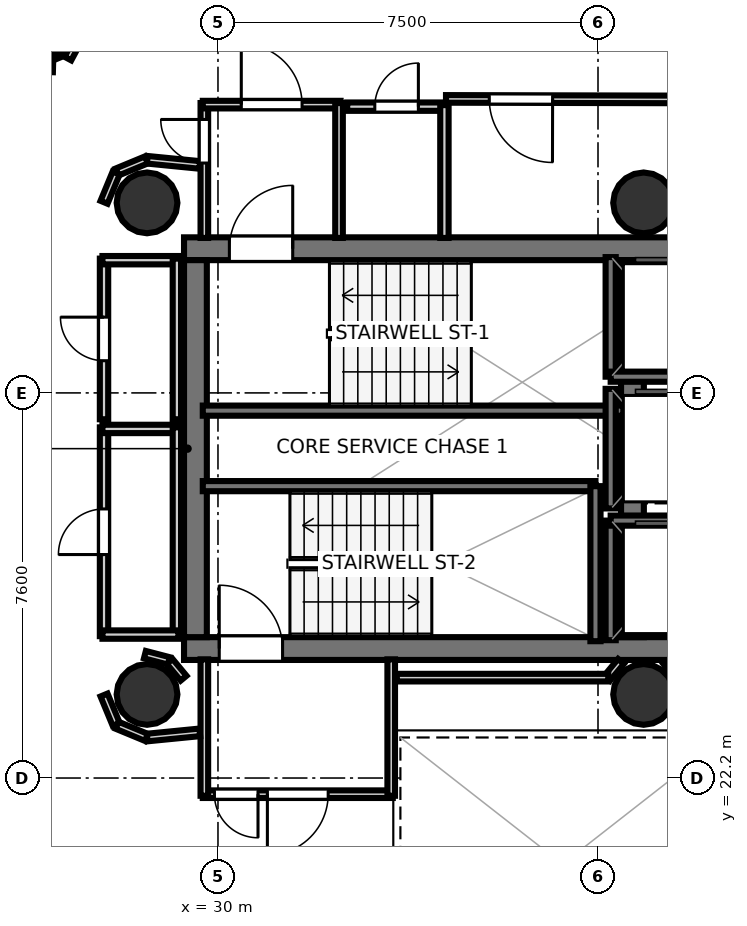
"""IFC4 building model, lengths in metres.
Left out: names, types, materials, properties, quantities, classifications, styles, units other than length and angle.
Written with IfcOpenShell. Run it as: python <this file> out.ifc"""

import sys

from ifc_helpers import new_model, si_unit, direction, frame, frame_2d, origin, origin_2d, place, context, subcontext, project, spatial, rectangle, hollow_circle, extrude, element, fill, save


model = new_model("IFC4")
c1 = context("Model", 3, precision=1e-05, world=origin(), true_north=direction((0.0, 1.0)))
c2 = subcontext(c1, "Body", "Model", "MODEL_VIEW")
j1 = project(units=[si_unit("LENGTHUNIT", "METRE"), si_unit("PLANEANGLEUNIT", "RADIAN")], contexts=[c1])
p1 = place(None, origin())
s1 = spatial("IfcSite", under=j1, at=p1, CompositionType="ELEMENT")
p2 = place(p1, origin())
s2 = spatial("IfcBuilding", under=s1, at=p2, CompositionType="ELEMENT")
p3 = place(p2, frame((0.0, 0.0, 222.5)))
s3 = spatial("IfcBuildingStorey", under=s2, at=p3, CompositionType="ELEMENT", Elevation=222.5)
p4 = place(p3, frame((29.33, 32.645, 0.0), z_axis=(0.0, 0.0, 1.0), x_axis=(1.0, 0.0, 0.0)))
e1 = element("IfcWall", 1, at=p4, inside=s3, PredefinedType="SHEAR", context=c2, shape_type="SweptSolid", body=[
    extrude(rectangle(XDim=10.52, YDim=0.45, at=frame_2d((5.26, 0.0))), origin(), (0.0, 0.0, 1.0), 3.52),
])
p5 = place(p4, frame((0.895, 0.0, 0.0)))
e2 = element("IfcOpeningElement", 2, at=p5, cuts=e1, PredefinedType="OPENING", context=c2, shape_type="SweptSolid", body=[
    extrude(rectangle(XDim=1.25, YDim=2.15, at=frame_2d((0.625, 1.075))), frame((0.0, 0.235, 0.0), z_axis=(0.0, -1.0, 0.0), x_axis=(1.0, 0.0, 0.0)), (0.0, 0.0, 1.0), 0.47),
])
p6 = place(p3, frame((29.33, 24.755, 0.0), z_axis=(0.0, 0.0, 1.0), x_axis=(1.0, 0.0, 0.0)))
e3 = element("IfcWall", 3, at=p6, inside=s3, PredefinedType="SHEAR", context=c2, shape_type="SweptSolid", body=[
    extrude(rectangle(XDim=10.52, YDim=0.45, at=frame_2d((5.26, 0.0))), origin(), (0.0, 0.0, 1.0), 3.52),
])
p7 = place(p6, frame((0.695, 0.0, 0.0)))
e4 = element("IfcOpeningElement", 4, at=p7, cuts=e3, PredefinedType="OPENING", context=c2, shape_type="SweptSolid", body=[
    extrude(rectangle(XDim=1.25, YDim=2.15, at=frame_2d((0.625, 1.075))), frame((0.0, 0.235, 0.0), z_axis=(0.0, -1.0, 0.0), x_axis=(1.0, 0.0, 0.0)), (0.0, 0.0, 1.0), 0.47),
])
for number, where, z_axis, x_axis in (
    (5, (29.555, 24.98, 0.0), (0.0, 0.0, 1.0), (0.0, 1.0, 0.0)),
    (6, (38.18, 24.98, 0.0), (0.0, 0.0, 1.0), (0.0, 1.0, 0.0)),
):
    element("IfcWall", number, at=place(p3, frame(where, z_axis=z_axis, x_axis=x_axis)), inside=s3, PredefinedType="SHEAR", context=c2, shape_type="SweptSolid", body=[
        extrude(rectangle(XDim=7.44, YDim=0.45, at=frame_2d((3.72, 0.0))), origin(), (0.0, 0.0, 1.0), 3.52),
    ])
for number, where, z_axis, x_axis in (
    (7, (28.6, 33.55, 0.0), (0.0, 0.0, 1.0), (1.0, 0.0, 0.0)),
    (8, (28.6, 23.85, 0.0), (0.0, 0.0, 1.0), (1.0, 0.0, 0.0)),
    (9, (38.4, 33.55, 0.0), (0.0, 0.0, 1.0), (1.0, 0.0, 0.0)),
    (10, (38.4, 23.85, 0.0), (0.0, 0.0, 1.0), (1.0, 0.0, 0.0)),
    (11, (26.431, 36.992, 0.0), (0.0, 0.0, 1.0), (1.0, 0.0, 0.0)),
):
    element("IfcColumn", number, at=place(p3, frame(where, z_axis=z_axis, x_axis=x_axis)), inside=s3, PredefinedType="COLUMN", context=c2, shape_type="SweptSolid", body=[
        extrude(hollow_circle(Radius=0.6, WallThickness=0.03, at=origin_2d()), origin(), (0.0, 0.0, 1.0), 3.7),
    ])
p8 = place(p3, frame((29.7, 29.45, 0.0), z_axis=(0.0, 0.0, 1.0), x_axis=(1.0, 0.0, 0.0)))
e12 = element("IfcWall", 12, at=p8, inside=s3, PredefinedType="SOLIDWALL", context=c2, shape_type="SweptSolid", body=[
    extrude(rectangle(XDim=8.3, YDim=0.2, at=frame_2d((4.15, 0.0))), origin(), (0.0, 0.0, 1.0), 3.52),
])
p9 = place(p3, frame((29.7, 27.96, 0.0), z_axis=(0.0, 0.0, 1.0), x_axis=(1.0, 0.0, 0.0)))
e13 = element("IfcWall", 13, at=p9, inside=s3, PredefinedType="SOLIDWALL", context=c2, shape_type="SweptSolid", body=[
    extrude(rectangle(XDim=7.75, YDim=0.2, at=frame_2d((3.875, 0.0))), origin(), (0.0, 0.0, 1.0), 3.52),
])
p10 = place(p3, frame((37.45, 24.9, 0.0), z_axis=(0.0, 0.0, 1.0), x_axis=(0.0, 1.0, 0.0)))
e14 = element("IfcWall", 14, at=p10, inside=s3, PredefinedType="SOLIDWALL", context=c2, shape_type="SweptSolid", body=[
    extrude(rectangle(XDim=3.06, YDim=0.2, at=frame_2d((1.53, 0.0))), origin(), (0.0, 0.0, 1.0), 3.52),
])
p11 = place(p3, frame((37.75, 30.12, 0.0), z_axis=(0.0, 0.0, 1.0), x_axis=(0.0, 1.0, 0.0)))
e15 = element("IfcWall", 15, at=p11, inside=s3, PredefinedType="SOLIDWALL", context=c2, shape_type="SweptSolid", body=[
    extrude(rectangle(XDim=2.36, YDim=0.2, at=frame_2d((1.18, 0.0))), origin(), (0.0, 0.0, 1.0), 3.52),
])
p12 = place(p3, frame((37.75, 30.12, 0.0), z_axis=(0.0, 0.0, 1.0), x_axis=(1.0, 0.0, 0.0)))
e16 = element("IfcWall", 16, at=p12, inside=s3, PredefinedType="SOLIDWALL", context=c2, shape_type="SweptSolid", body=[
    extrude(rectangle(XDim=2.1, YDim=0.2, at=frame_2d((1.05, 0.0))), origin(), (0.0, 0.0, 1.0), 3.52),
])
p13 = place(p3, frame((37.75, 24.92, 0.0), z_axis=(0.0, 0.0, 1.0), x_axis=(0.0, 1.0, 0.0)))
e17 = element("IfcWall", 17, at=p13, inside=s3, PredefinedType="SOLIDWALL", context=c2, shape_type="SweptSolid", body=[
    extrude(rectangle(XDim=2.36, YDim=0.2, at=frame_2d((1.18, 0.0))), origin(), (0.0, 0.0, 1.0), 3.52),
])
p14 = place(p3, frame((37.75, 27.28, 0.0), z_axis=(0.0, 0.0, 1.0), x_axis=(1.0, 0.0, 0.0)))
e18 = element("IfcWall", 18, at=p14, inside=s3, PredefinedType="SOLIDWALL", context=c2, shape_type="SweptSolid", body=[
    extrude(rectangle(XDim=2.1, YDim=0.2, at=frame_2d((1.05, 0.0))), origin(), (0.0, 0.0, 1.0), 3.52),
])
p15 = place(p3, frame((37.75, 27.52, 0.0), z_axis=(0.0, 0.0, 1.0), x_axis=(0.0, 1.0, 0.0)))
e19 = element("IfcWall", 19, at=p15, inside=s3, PredefinedType="SOLIDWALL", context=c2, shape_type="SweptSolid", body=[
    extrude(rectangle(XDim=2.36, YDim=0.2, at=frame_2d((1.18, 0.0))), origin(), (0.0, 0.0, 1.0), 3.52),
])
p16 = place(p3, frame((29.731, 32.858, 0.0), z_axis=(0.0, 0.0, 1.0), x_axis=(0.0, 1.0, 0.0)))
e20 = element("IfcWall", 20, at=p16, inside=s3, PredefinedType="PARTITIONING", context=c2, shape_type="SweptSolid", body=[
    extrude(rectangle(XDim=2.662, YDim=0.15, at=frame_2d((1.331, 0.0))), origin(), (0.0, 0.0, 1.0), 2.84),
])
p17 = place(p16, frame((1.478, 0.0, 0.0)))
e21 = element("IfcOpeningElement", 21, at=p17, cuts=e20, PredefinedType="OPENING", context=c2, shape_type="SweptSolid", body=[
    extrude(rectangle(XDim=0.86, YDim=2.05, at=frame_2d((0.43, 1.025))), frame((0.0, 0.085, 0.0), z_axis=(0.0, -1.0, 0.0), x_axis=(1.0, 0.0, 0.0)), (0.0, 0.0, 1.0), 0.17),
])
p18 = place(p3, frame((29.7, 35.489, 0.0), z_axis=(0.0, 0.0, 1.0), x_axis=(1.0, 0.0, 0.0)))
e22 = element("IfcWall", 22, at=p18, inside=s3, PredefinedType="PARTITIONING", context=c2, shape_type="SweptSolid", body=[
    extrude(rectangle(XDim=2.72, YDim=0.15, at=frame_2d((1.36, 0.0))), origin(), (0.0, 0.0, 1.0), 2.84),
])
p19 = place(p18, frame((0.76, 0.0, 0.0)))
e23 = element("IfcOpeningElement", 23, at=p19, cuts=e22, PredefinedType="OPENING", context=c2, shape_type="SweptSolid", body=[
    extrude(rectangle(XDim=1.2, YDim=2.15, at=frame_2d((0.6, 1.075))), frame((0.0, 0.085, 0.0), z_axis=(0.0, -1.0, 0.0), x_axis=(1.0, 0.0, 0.0)), (0.0, 0.0, 1.0), 0.17),
])
p20 = place(p3, frame((32.389, 35.52, 0.0), z_axis=(0.0, 0.0, 1.0), x_axis=(0.0, -1.0, 0.0)))
e24 = element("IfcWall", 24, at=p20, inside=s3, PredefinedType="PARTITIONING", context=c2, shape_type="SweptSolid", body=[
    extrude(rectangle(XDim=2.662, YDim=0.15, at=frame_2d((1.331, 0.0))), origin(), (0.0, 0.0, 1.0), 2.84),
])
p21 = place(p3, frame((33.45, 21.881, 0.0), z_axis=(0.0, 0.0, 1.0), x_axis=(-1.0, 0.0, 0.0)))
e25 = element("IfcWall", 25, at=p21, inside=s3, PredefinedType="PARTITIONING", context=c2, shape_type="SweptSolid", body=[
    extrude(rectangle(XDim=3.75, YDim=0.15, at=frame_2d((1.875, 0.0))), origin(), (0.0, 0.0, 1.0), 2.84),
])
p22 = place(p21, frame((1.275, 0.0, 0.0)))
e26 = element("IfcOpeningElement", 26, at=p22, cuts=e25, PredefinedType="OPENING", context=c2, shape_type="SweptSolid", body=[
    extrude(rectangle(XDim=1.2, YDim=2.15, at=frame_2d((0.6, 1.075))), frame((0.0, 0.085, 0.0), z_axis=(0.0, -1.0, 0.0), x_axis=(1.0, 0.0, 0.0)), (0.0, 0.0, 1.0), 0.17),
])
p23 = place(p21, frame((2.66, 0.0, 0.0)))
e27 = element("IfcOpeningElement", 27, at=p23, cuts=e25, PredefinedType="OPENING", context=c2, shape_type="SweptSolid", body=[
    extrude(rectangle(XDim=0.86, YDim=2.05, at=frame_2d((0.43, 1.025))), frame((0.0, 0.085, 0.0), z_axis=(0.0, -1.0, 0.0), x_axis=(1.0, 0.0, 0.0)), (0.0, 0.0, 1.0), 0.17),
])
for number, where, z_axis, x_axis in (
    (28, (29.731, 21.85, 0.0), (0.0, 0.0, 1.0), (0.0, 1.0, 0.0)),
    (29, (33.419, 24.542, 0.0), (0.0, 0.0, 1.0), (0.0, -1.0, 0.0)),
):
    element("IfcWall", number, at=place(p3, frame(where, z_axis=z_axis, x_axis=x_axis)), inside=s3, PredefinedType="PARTITIONING", context=c2, shape_type="SweptSolid", body=[
        extrude(rectangle(XDim=2.692, YDim=0.15, at=frame_2d((1.346, 0.0))), origin(), (0.0, 0.0, 1.0), 2.84),
    ])
p24 = place(p3, frame((32.55, 35.449, 0.0), z_axis=(0.0, 0.0, 1.0), x_axis=(1.0, 0.0, 0.0)))
e30 = element("IfcWall", 30, at=p24, inside=s3, PredefinedType="PLUMBINGWALL", context=c2, shape_type="SweptSolid", body=[
    extrude(rectangle(XDim=1.95, YDim=0.165, at=frame_2d((0.975, 0.0))), origin(), (0.0, 0.0, 1.0), 2.84),
])
p25 = place(p24, frame((0.545, 0.0, 0.0)))
e31 = element("IfcOpeningElement", 31, at=p25, cuts=e30, PredefinedType="OPENING", context=c2, shape_type="SweptSolid", body=[
    extrude(rectangle(XDim=0.86, YDim=2.05, at=frame_2d((0.43, 1.025))), frame((0.0, 0.093, 0.0), z_axis=(0.0, -1.0, 0.0), x_axis=(1.0, 0.0, 0.0)), (0.0, 0.0, 1.0), 0.185),
])
p26 = place(p3, frame((34.469, 35.48, 0.0), z_axis=(0.0, 0.0, 1.0), x_axis=(0.0, -1.0, 0.0)))
e32 = element("IfcWall", 32, at=p26, inside=s3, PredefinedType="PLUMBINGWALL", context=c2, shape_type="SweptSolid", body=[
    extrude(rectangle(XDim=2.622, YDim=0.165, at=frame_2d((1.311, 0.0))), origin(), (0.0, 0.0, 1.0), 2.84),
])
p27 = place(p3, frame((27.751, 25.0, 0.0), z_axis=(0.0, 0.0, 1.0), x_axis=(0.0, 1.0, 0.0)))
e33 = element("IfcWall", 33, at=p27, inside=s3, PredefinedType="PLUMBINGWALL", context=c2, shape_type="SweptSolid", body=[
    extrude(rectangle(XDim=4.12, YDim=0.165, at=frame_2d((2.06, 0.0))), origin(), (0.0, 0.0, 1.0), 2.84),
])
p28 = place(p27, frame((1.61, 0.0, 0.0)))
e34 = element("IfcOpeningElement", 34, at=p28, cuts=e33, PredefinedType="OPENING", context=c2, shape_type="SweptSolid", body=[
    extrude(rectangle(XDim=0.9, YDim=2.1, at=frame_2d((0.45, 1.05))), frame((0.0, 0.093, 0.0), z_axis=(0.0, -1.0, 0.0), x_axis=(1.0, 0.0, 0.0)), (0.0, 0.0, 1.0), 0.185),
])
p29 = place(p3, frame((27.72, 29.089, 0.0), z_axis=(0.0, 0.0, 1.0), x_axis=(1.0, 0.0, 0.0)))
e35 = element("IfcWall", 35, at=p29, inside=s3, PredefinedType="PLUMBINGWALL", context=c2, shape_type="SweptSolid", body=[
    extrude(rectangle(XDim=1.5, YDim=0.165, at=frame_2d((0.75, 0.0))), origin(), (0.0, 0.0, 1.0), 2.84),
])
p30 = place(p3, frame((29.189, 29.12, 0.0), z_axis=(0.0, 0.0, 1.0), x_axis=(0.0, -1.0, 0.0)))
e36 = element("IfcWall", 36, at=p30, inside=s3, PredefinedType="PLUMBINGWALL", context=c2, shape_type="SweptSolid", body=[
    extrude(rectangle(XDim=4.12, YDim=0.165, at=frame_2d((2.06, 0.0))), origin(), (0.0, 0.0, 1.0), 2.84),
])
p31 = place(p3, frame((29.22, 25.031, 0.0), z_axis=(0.0, 0.0, 1.0), x_axis=(-1.0, 0.0, 0.0)))
e37 = element("IfcWall", 37, at=p31, inside=s3, PredefinedType="PLUMBINGWALL", context=c2, shape_type="SweptSolid", body=[
    extrude(rectangle(XDim=1.5, YDim=0.165, at=frame_2d((0.75, 0.0))), origin(), (0.0, 0.0, 1.0), 2.84),
])
p32 = place(p3, frame((27.751, 29.28, 0.0), z_axis=(0.0, 0.0, 1.0), x_axis=(0.0, 1.0, 0.0)))
e38 = element("IfcWall", 38, at=p32, inside=s3, PredefinedType="PLUMBINGWALL", context=c2, shape_type="SweptSolid", body=[
    extrude(rectangle(XDim=3.17, YDim=0.165, at=frame_2d((1.585, 0.0))), origin(), (0.0, 0.0, 1.0), 2.84),
])
p33 = place(p32, frame((1.155, 0.0, 0.0)))
e39 = element("IfcOpeningElement", 39, at=p33, cuts=e38, PredefinedType="OPENING", context=c2, shape_type="SweptSolid", body=[
    extrude(rectangle(XDim=0.86, YDim=2.05, at=frame_2d((0.43, 1.025))), frame((0.0, 0.093, 0.0), z_axis=(0.0, -1.0, 0.0), x_axis=(1.0, 0.0, 0.0)), (0.0, 0.0, 1.0), 0.185),
])
p34 = place(p3, frame((27.72, 32.419, 0.0), z_axis=(0.0, 0.0, 1.0), x_axis=(1.0, 0.0, 0.0)))
e40 = element("IfcWall", 40, at=p34, inside=s3, PredefinedType="PLUMBINGWALL", context=c2, shape_type="SweptSolid", body=[
    extrude(rectangle(XDim=1.5, YDim=0.165, at=frame_2d((0.75, 0.0))), origin(), (0.0, 0.0, 1.0), 2.84),
])
p35 = place(p3, frame((29.189, 32.45, 0.0), z_axis=(0.0, 0.0, 1.0), x_axis=(0.0, -1.0, 0.0)))
e41 = element("IfcWall", 41, at=p35, inside=s3, PredefinedType="PLUMBINGWALL", context=c2, shape_type="SweptSolid", body=[
    extrude(rectangle(XDim=3.17, YDim=0.165, at=frame_2d((1.585, 0.0))), origin(), (0.0, 0.0, 1.0), 2.84),
])
p36 = place(p3, frame((29.321, 24.17, 0.0), z_axis=(0.0, 0.0, 1.0), x_axis=(-0.638008265708, 0.770029514296, 0.0)))
e42 = element("IfcWall", 42, at=p36, inside=s3, PredefinedType="PARTITIONING", context=c2, shape_type="SweptSolid", body=[
    extrude(rectangle(XDim=0.431, YDim=0.15, at=frame_2d((0.215, 0.0))), origin(), (0.0, 0.0, 1.0), 2.84),
])
p37 = place(p3, frame((29.03, 24.512, 0.0), z_axis=(0.0, 0.0, 1.0), x_axis=(-0.967681003213, 0.252177469296, 0.0)))
e43 = element("IfcWall", 43, at=p37, inside=s3, PredefinedType="PARTITIONING", context=c2, shape_type="SweptSolid", body=[
    extrude(rectangle(XDim=0.488, YDim=0.15, at=frame_2d((0.244, 0.0))), origin(), (0.0, 0.0, 1.0), 2.84),
])
for number, where, z_axis, x_axis in (
    (44, (39.121, 24.17, 0.0), (0.0, 0.0, 1.0), (-0.638, 0.77, 0.0)),
    (45, (37.954, 24.502, 0.0), (0.0, 0.0, 1.0), (-0.638, -0.77, 0.0)),
):
    element("IfcWall", number, at=place(p3, frame(where, z_axis=z_axis, x_axis=x_axis)), inside=s3, PredefinedType="PARTITIONING", context=c2, shape_type="SweptSolid", body=[
        extrude(rectangle(XDim=0.431, YDim=0.15, at=frame_2d((0.215, 0.0))), origin(), (0.0, 0.0, 1.0), 2.84),
    ])
p38 = place(p3, frame((37.703, 24.181, 0.0), z_axis=(0.0, 0.0, 1.0), x_axis=(-1.0, 0.0, 0.0)))
e46 = element("IfcWall", 46, at=p38, inside=s3, PredefinedType="PARTITIONING", context=c2, shape_type="SweptSolid", body=[
    extrude(rectangle(XDim=4.173, YDim=0.15, at=frame_2d((2.086, 0.0))), origin(), (0.0, 0.0, 1.0), 2.84),
])
p39 = place(p3, frame((39.418, 35.591, 0.0), z_axis=(0.0, 0.0, 1.0), x_axis=(-0.999997505315, 0.002233688461, 0.0)))
e47 = element("IfcWall", 47, at=p39, inside=s3, PredefinedType="PARTITIONING", context=c2, shape_type="SweptSolid", body=[
    extrude(rectangle(XDim=4.918, YDim=0.15, at=frame_2d((2.459, 0.0))), origin(), (0.0, 0.0, 1.0), 2.84),
])
p40 = place(p39, frame((2.814, 0.0, 0.0)))
e48 = element("IfcOpeningElement", 48, at=p40, cuts=e47, PredefinedType="OPENING", context=c2, shape_type="SweptSolid", body=[
    extrude(rectangle(XDim=1.25, YDim=2.2, at=frame_2d((0.625, 1.1))), frame((0.0, 0.085, 0.0), z_axis=(0.0, -1.0, 0.0), x_axis=(1.0, 0.0, 0.0)), (0.0, 0.0, 1.0), 0.17),
])
p41 = place(p3, frame((29.641, 34.299, 0.0), z_axis=(0.0, 0.0, 1.0), x_axis=(-0.995179827095, 0.098066873836, 0.0)))
e49 = element("IfcWall", 49, at=p41, inside=s3, PredefinedType="PARTITIONING", context=c2, shape_type="SweptSolid", body=[
    extrude(rectangle(XDim=1.043, YDim=0.15, at=frame_2d((0.521, 0.0))), origin(), (0.0, 0.0, 1.0), 2.84),
])
p42 = place(p3, frame((28.588, 34.399, 0.0), z_axis=(0.0, 0.0, 1.0), x_axis=(-0.923846138666, -0.382764042293, 0.0)))
e50 = element("IfcWall", 50, at=p42, inside=s3, PredefinedType="PARTITIONING", context=c2, shape_type="SweptSolid", body=[
    extrude(rectangle(XDim=0.628, YDim=0.15, at=frame_2d((0.314, 0.0))), origin(), (0.0, 0.0, 1.0), 2.84),
])
p43 = place(p3, frame((27.991, 34.142, 0.0), z_axis=(0.0, 0.0, 1.0), x_axis=(-0.382569489008, -0.923926721164, 0.0)))
e51 = element("IfcWall", 51, at=p43, inside=s3, PredefinedType="PARTITIONING", context=c2, shape_type="SweptSolid", body=[
    extrude(rectangle(XDim=0.627, YDim=0.15, at=frame_2d((0.313, 0.0))), origin(), (0.0, 0.0, 1.0), 2.84),
])
for number, where, z_axis, x_axis in (
    (52, (27.751, 23.838, 0.0), (0.0, 0.0, 1.0), (0.382, -0.924, 0.0)),
    (53, (28.008, 23.241, 0.0), (0.0, 0.0, 1.0), (0.924, -0.382, 0.0)),
):
    element("IfcWall", number, at=place(p3, frame(where, z_axis=z_axis, x_axis=x_axis)), inside=s3, PredefinedType="PARTITIONING", context=c2, shape_type="SweptSolid", body=[
        extrude(rectangle(XDim=0.627, YDim=0.15, at=frame_2d((0.314, 0.0))), origin(), (0.0, 0.0, 1.0), 2.84),
    ])
p44 = place(p3, frame((28.603, 22.999, 0.0), z_axis=(0.0, 0.0, 1.0), x_axis=(0.995179827095, 0.098066873836, 0.0)))
e54 = element("IfcWall", 54, at=p44, inside=s3, PredefinedType="PARTITIONING", context=c2, shape_type="SweptSolid", body=[
    extrude(rectangle(XDim=1.043, YDim=0.15, at=frame_2d((0.521, 0.0))), origin(), (0.0, 0.0, 1.0), 2.84),
])
p45 = place(p3, frame((25.449, 36.238, 0.0), z_axis=(0.0, 0.0, 1.0), x_axis=(0.999651698073, -0.026390955635, 0.0)))
e55 = element("IfcWall", 55, at=p45, inside=s3, PredefinedType="PARTITIONING", context=c2, shape_type="SweptSolid", body=[
    extrude(rectangle(XDim=1.295, YDim=0.15, at=frame_2d((0.647, 0.0))), origin(), (0.0, 0.0, 1.0), 2.84),
])
p46 = place(p3, frame((27.038, 36.398, 0.0), z_axis=(0.0, 0.0, 1.0), x_axis=(0.471865548338, 0.881670519123, 0.0)))
e56 = element("IfcWall", 56, at=p46, inside=s3, PredefinedType="PARTITIONING", context=c2, shape_type="SweptSolid", body=[
    extrude(rectangle(XDim=0.476, YDim=0.15, at=frame_2d((0.238, 0.0))), origin(), (0.0, 0.0, 1.0), 2.84),
])
p47 = place(p3, frame((26.945, 36.501, 0.0), z_axis=(0.0, 0.0, 1.0), x_axis=(-0.923881792955, -0.382677975126, 0.0)))
e57 = element("IfcWall", 57, at=p47, inside=s3, PredefinedType="PARTITIONING", context=c2, shape_type="SweptSolid", body=[
    extrude(rectangle(XDim=0.573, YDim=0.105, at=frame_2d((0.287, 0.0))), origin(), (0.0, 0.0, 1.0), 2.84),
])
p48 = place(p5, origin())
e58 = element("IfcDoor", 58, at=p48, inside=s3, OperationType="SINGLE_SWING_RIGHT", PredefinedType="DOOR", context=c2, shape_type="SweptSolid", body=[
    extrude(rectangle(XDim=1.25, YDim=2.15, at=frame_2d((0.625, 1.075))), frame((0.0, 0.025, 0.0), z_axis=(0.0, -1.0, 0.0), x_axis=(1.0, 0.0, 0.0)), (0.0, 0.0, 1.0), 0.05),
])
fill(e2, e58)
p49 = place(p7, origin())
e59 = element("IfcDoor", 59, at=p49, inside=s3, OperationType="SINGLE_SWING_LEFT", PredefinedType="DOOR", context=c2, shape_type="SweptSolid", body=[
    extrude(rectangle(XDim=1.25, YDim=2.15, at=frame_2d((0.625, 1.075))), frame((0.0, 0.025, 0.0), z_axis=(0.0, -1.0, 0.0), x_axis=(1.0, 0.0, 0.0)), (0.0, 0.0, 1.0), 0.05),
])
fill(e4, e59)
p50 = place(p19, origin())
e60 = element("IfcDoor", 60, at=p50, inside=s3, OperationType="SINGLE_SWING_LEFT", PredefinedType="DOOR", context=c2, shape_type="SweptSolid", body=[
    extrude(rectangle(XDim=1.2, YDim=2.15, at=frame_2d((0.6, 1.075))), frame((0.0, 0.025, 0.0), z_axis=(0.0, -1.0, 0.0), x_axis=(1.0, 0.0, 0.0)), (0.0, 0.0, 1.0), 0.05),
])
fill(e23, e60)
p51 = place(p22, origin())
e61 = element("IfcDoor", 61, at=p51, inside=s3, OperationType="SINGLE_SWING_RIGHT", PredefinedType="DOOR", context=c2, shape_type="SweptSolid", body=[
    extrude(rectangle(XDim=1.2, YDim=2.15, at=frame_2d((0.6, 1.075))), frame((0.0, 0.025, 0.0), z_axis=(0.0, -1.0, 0.0), x_axis=(1.0, 0.0, 0.0)), (0.0, 0.0, 1.0), 0.05),
])
fill(e26, e61)
p52 = place(p25, origin())
e62 = element("IfcDoor", 62, at=p52, inside=s3, OperationType="SINGLE_SWING_RIGHT", PredefinedType="DOOR", context=c2, shape_type="SweptSolid", body=[
    extrude(rectangle(XDim=0.86, YDim=2.05, at=frame_2d((0.43, 1.025))), frame((0.0, 0.025, 0.0), z_axis=(0.0, -1.0, 0.0), x_axis=(1.0, 0.0, 0.0)), (0.0, 0.0, 1.0), 0.05),
])
fill(e31, e62)
p53 = place(p28, origin())
e63 = element("IfcDoor", 63, at=p53, inside=s3, OperationType="SINGLE_SWING_LEFT", PredefinedType="DOOR", context=c2, shape_type="SweptSolid", body=[
    extrude(rectangle(XDim=0.9, YDim=2.1, at=frame_2d((0.45, 1.05))), frame((0.0, 0.025, 0.0), z_axis=(0.0, -1.0, 0.0), x_axis=(1.0, 0.0, 0.0)), (0.0, 0.0, 1.0), 0.05),
])
fill(e34, e63)
p54 = place(p33, origin())
e64 = element("IfcDoor", 64, at=p54, inside=s3, OperationType="SINGLE_SWING_RIGHT", PredefinedType="DOOR", context=c2, shape_type="SweptSolid", body=[
    extrude(rectangle(XDim=0.86, YDim=2.05, at=frame_2d((0.43, 1.025))), frame((0.0, 0.025, 0.0), z_axis=(0.0, -1.0, 0.0), x_axis=(1.0, 0.0, 0.0)), (0.0, 0.0, 1.0), 0.05),
])
fill(e39, e64)
p55 = place(p17, origin())
e65 = element("IfcDoor", 65, at=p55, inside=s3, OperationType="SINGLE_SWING_RIGHT", PredefinedType="DOOR", context=c2, shape_type="SweptSolid", body=[
    extrude(rectangle(XDim=0.86, YDim=2.05, at=frame_2d((0.43, 1.025))), frame((0.0, 0.025, 0.0), z_axis=(0.0, -1.0, 0.0), x_axis=(1.0, 0.0, 0.0)), (0.0, 0.0, 1.0), 0.05),
])
fill(e21, e65)
p56 = place(p23, origin())
e66 = element("IfcDoor", 66, at=p56, inside=s3, OperationType="SINGLE_SWING_LEFT", PredefinedType="DOOR", context=c2, shape_type="SweptSolid", body=[
    extrude(rectangle(XDim=0.86, YDim=2.05, at=frame_2d((0.43, 1.025))), frame((0.0, 0.025, 0.0), z_axis=(0.0, -1.0, 0.0), x_axis=(1.0, 0.0, 0.0)), (0.0, 0.0, 1.0), 0.05),
])
fill(e27, e66)
p57 = place(p40, origin())
e67 = element("IfcDoor", 67, at=p57, inside=s3, OperationType="SINGLE_SWING_LEFT", PredefinedType="DOOR", context=c2, shape_type="SweptSolid", body=[
    extrude(rectangle(XDim=1.25, YDim=2.2, at=frame_2d((0.625, 1.1))), frame((0.0, 0.025, 0.0), z_axis=(0.0, -1.0, 0.0), x_axis=(1.0, 0.0, 0.0)), (0.0, 0.0, 1.0), 0.05),
])
fill(e48, e67)
save(model, sys.argv[1])
